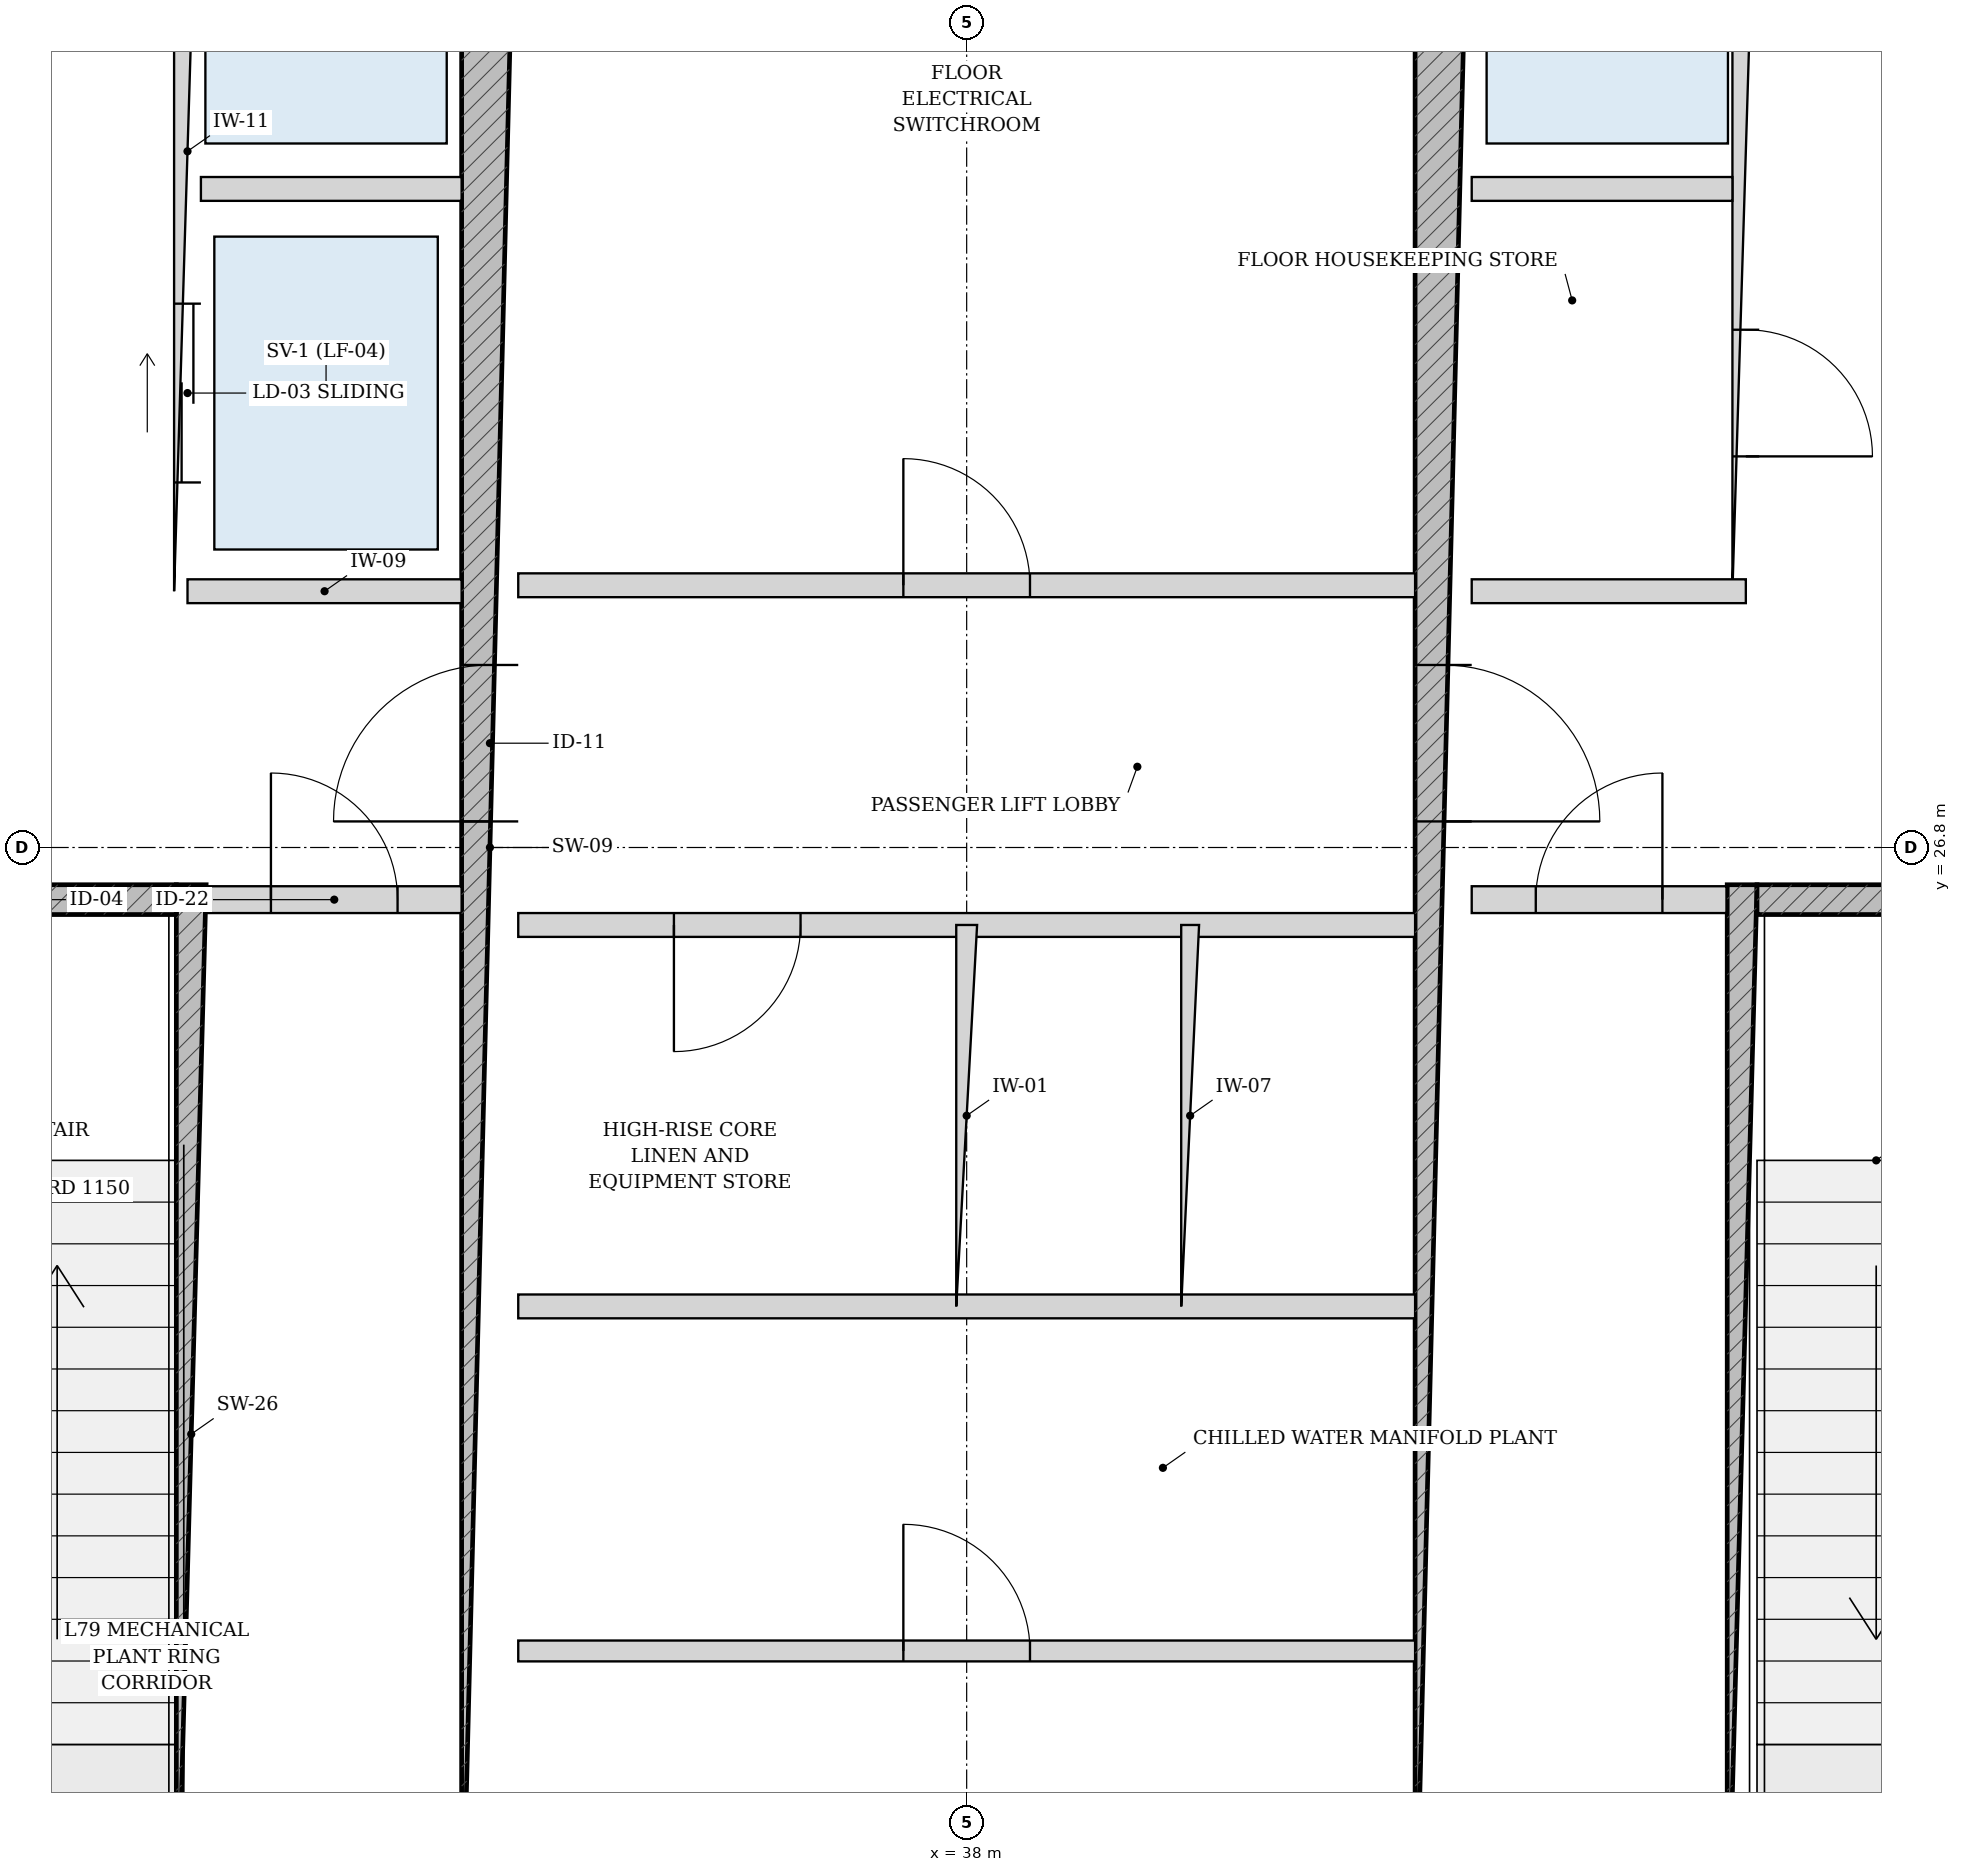
"""IFC4 building model, lengths in metres.
Left out: names, types, materials, properties, quantities, classifications, styles, units other than length and angle.
Written with IfcOpenShell. Run it as: python <this file> out.ifc"""

import sys

from ifc_helpers import new_model, si_unit, direction, frame, frame_2d, origin, place, context, subcontext, project, spatial, rectangle, extrude, source, transform, mapped, element, fill, save


model = new_model("IFC4")
c1 = context("Model", 3, precision=1e-05, world=origin(), true_north=direction((-0.2419218956, 0.970295726276)))
c2 = subcontext(c1, "Body", "Model", "MODEL_VIEW")
j1 = project(units=[si_unit("LENGTHUNIT", "METRE"), si_unit("PLANEANGLEUNIT", "RADIAN")], contexts=[c1])
p1 = place(None, origin())
s1 = spatial("IfcSite", under=j1, at=p1, CompositionType="ELEMENT")
p2 = place(p1, origin())
s2 = spatial("IfcBuilding", under=s1, at=p2, CompositionType="ELEMENT")
p3 = place(p2, frame((0.0, 0.0, 300.7)))
s3 = spatial("IfcBuildingStorey", under=s2, at=p3, CompositionType="ELEMENT", Elevation=300.7)
p4 = place(p3, frame((32.795, 19.175, 0.0), z_axis=(0.0, 0.0, 1.0), x_axis=(0.0, 1.0, 0.0)))
e1 = element("IfcWall", 1, at=p4, inside=s3, PredefinedType="SOLIDWALL", context=c2, shape_type="SweptSolid", body=[
    extrude(rectangle(XDim=7.375, YDim=0.2, at=frame_2d((3.688, 0.0))), origin(), (0.0, 0.0, 1.0), 4.98),
])
p5 = place(p3, frame((29.375, 26.45, 0.0), z_axis=(0.0, 0.0, 1.0), x_axis=(1.0, 0.0, 0.0)))
e2 = element("IfcWall", 2, at=p5, inside=s3, PredefinedType="SOLIDWALL", context=c2, shape_type="SweptSolid", body=[
    extrude(rectangle(XDim=3.32, YDim=0.2, at=frame_2d((1.66, 0.0))), origin(), (0.0, 0.0, 1.0), 4.98),
])
p6 = place(p5, frame((1.185, 0.0, 0.0)))
e3 = element("IfcOpeningElement", 3, at=p6, cuts=e2, PredefinedType="OPENING", context=c2, shape_type="SweptSolid", body=[
    extrude(rectangle(XDim=0.95, YDim=2.15, at=frame_2d((0.475, 1.075))), frame((0.0, 0.11, 0.0), z_axis=(0.0, -1.0, 0.0), x_axis=(1.0, 0.0, 0.0)), (0.0, 0.0, 1.0), 0.22),
])
p7 = place(p3, frame((43.205, 19.175, 0.0), z_axis=(0.0, 0.0, 1.0), x_axis=(0.0, 1.0, 0.0)))
e4 = element("IfcWall", 4, at=p7, inside=s3, PredefinedType="SOLIDWALL", context=c2, shape_type="SweptSolid", body=[
    extrude(rectangle(XDim=7.375, YDim=0.2, at=frame_2d((3.688, 0.0))), origin(), (0.0, 0.0, 1.0), 4.98),
])
p8 = place(p3, frame((43.305, 26.45, 0.0), z_axis=(0.0, 0.0, 1.0), x_axis=(1.0, 0.0, 0.0)))
e5 = element("IfcWall", 5, at=p8, inside=s3, PredefinedType="SOLIDWALL", context=c2, shape_type="SweptSolid", body=[
    extrude(rectangle(XDim=3.32, YDim=0.2, at=frame_2d((1.66, 0.0))), origin(), (0.0, 0.0, 1.0), 4.98),
])
p9 = place(p8, frame((1.185, 0.0, 0.0)))
e6 = element("IfcOpeningElement", 6, at=p9, cuts=e5, PredefinedType="OPENING", context=c2, shape_type="SweptSolid", body=[
    extrude(rectangle(XDim=0.95, YDim=2.15, at=frame_2d((0.475, 1.075))), frame((0.0, 0.11, 0.0), z_axis=(0.0, -1.0, 0.0), x_axis=(1.0, 0.0, 0.0)), (0.0, 0.0, 1.0), 0.22),
])
p10 = place(p3, frame((34.8, 19.175, 0.0), z_axis=(0.0, 0.0, 1.0), x_axis=(0.0, 1.0, 0.0)))
e7 = element("IfcWall", 7, at=p10, inside=s3, PredefinedType="SHEAR", context=c2, shape_type="SweptSolid", body=[
    extrude(rectangle(XDim=15.25, YDim=0.38, at=frame_2d((7.625, 0.0))), origin(), (0.0, 0.0, 1.0), 4.98),
])
p11 = place(p10, frame((7.8, 0.0, 0.0)))
e8 = element("IfcOpeningElement", 8, at=p11, cuts=e7, PredefinedType="OPENING", context=c2, shape_type="SweptSolid", body=[
    extrude(rectangle(XDim=1.05, YDim=2.15, at=frame_2d((0.525, 1.075))), frame((0.0, 0.2, 0.0), z_axis=(0.0, -1.0, 0.0), x_axis=(1.0, 0.0, 0.0)), (0.0, 0.0, 1.0), 0.4),
])
p12 = place(p3, frame((41.2, 19.175, 0.0), z_axis=(0.0, 0.0, 1.0), x_axis=(0.0, 1.0, 0.0)))
e9 = element("IfcWall", 9, at=p12, inside=s3, PredefinedType="SHEAR", context=c2, shape_type="SweptSolid", body=[
    extrude(rectangle(XDim=15.25, YDim=0.38, at=frame_2d((7.625, 0.0))), origin(), (0.0, 0.0, 1.0), 4.98),
])
p13 = place(p12, frame((7.8, 0.0, 0.0)))
e10 = element("IfcOpeningElement", 10, at=p13, cuts=e9, PredefinedType="OPENING", context=c2, shape_type="SweptSolid", body=[
    extrude(rectangle(XDim=1.05, YDim=2.15, at=frame_2d((0.525, 1.075))), frame((0.0, 0.2, 0.0), z_axis=(0.0, -1.0, 0.0), x_axis=(1.0, 0.0, 0.0)), (0.0, 0.0, 1.0), 0.4),
])
p14 = place(p3, frame((32.9, 26.45, 0.0), z_axis=(0.0, 0.0, 1.0), x_axis=(1.0, 0.0, 0.0)))
e11 = element("IfcWall", 11, at=p14, inside=s3, PredefinedType="PARTITIONING", context=c2, shape_type="SweptSolid", body=[
    extrude(rectangle(XDim=1.71, YDim=0.18, at=frame_2d((0.855, 0.0))), origin(), (0.0, 0.0, 1.0), 4.98),
])
p15 = place(p14, frame((0.43, 0.0, 0.0)))
e12 = element("IfcOpeningElement", 12, at=p15, cuts=e11, PredefinedType="OPENING", context=c2, shape_type="SweptSolid", body=[
    extrude(rectangle(XDim=0.85, YDim=2.1, at=frame_2d((0.425, 1.05))), frame((0.0, 0.1, 0.0), z_axis=(0.0, -1.0, 0.0), x_axis=(1.0, 0.0, 0.0)), (0.0, 0.0, 1.0), 0.2),
])
p16 = place(p3, frame((41.39, 26.45, 0.0), z_axis=(0.0, 0.0, 1.0), x_axis=(1.0, 0.0, 0.0)))
e13 = element("IfcWall", 13, at=p16, inside=s3, PredefinedType="PARTITIONING", context=c2, shape_type="SweptSolid", body=[
    extrude(rectangle(XDim=1.71, YDim=0.18, at=frame_2d((0.855, 0.0))), origin(), (0.0, 0.0, 1.0), 4.98),
])
p17 = place(p16, frame((0.43, 0.0, 0.0)))
e14 = element("IfcOpeningElement", 14, at=p17, cuts=e13, PredefinedType="OPENING", context=c2, shape_type="SweptSolid", body=[
    extrude(rectangle(XDim=0.85, YDim=2.1, at=frame_2d((0.425, 1.05))), frame((0.0, 0.1, 0.0), z_axis=(0.0, -1.0, 0.0), x_axis=(1.0, 0.0, 0.0)), (0.0, 0.0, 1.0), 0.2),
])
p18 = place(p3, frame((32.77, 28.52, 0.0), z_axis=(0.0, 0.0, 1.0), x_axis=(0.0, 1.0, 0.0)))
e15 = element("IfcWall", 15, at=p18, inside=s3, PredefinedType="PARTITIONING", context=c2, shape_type="SweptSolid", body=[
    extrude(rectangle(XDim=5.905, YDim=0.18, at=frame_2d((2.953, 0.0))), origin(), (0.0, 0.0, 1.0), 4.98),
])
p19 = place(p18, frame((3.655, 0.0, 0.0)))
e16 = element("IfcOpeningElement", 16, at=p19, cuts=e15, PredefinedType="OPENING", context=c2, shape_type="SweptSolid", body=[
    extrude(rectangle(XDim=1.15, YDim=2.2, at=frame_2d((0.575, 1.1))), frame((0.0, 0.1, 0.0), z_axis=(0.0, -1.0, 0.0), x_axis=(1.0, 0.0, 0.0)), (0.0, 0.0, 1.0), 0.2),
])
p20 = place(p18, frame((0.73, 0.0, 0.0)))
e17 = element("IfcOpeningElement", 17, at=p20, cuts=e15, PredefinedType="OPENING", context=c2, shape_type="SweptSolid", body=[
    extrude(rectangle(XDim=1.2, YDim=2.25, at=frame_2d((0.6, 1.125))), frame((0.0, 0.1, 0.0), z_axis=(0.0, -1.0, 0.0), x_axis=(1.0, 0.0, 0.0)), (0.0, 0.0, 1.0), 0.2),
])
p21 = place(p3, frame((32.86, 31.22, 0.0), z_axis=(0.0, 0.0, 1.0), x_axis=(1.0, 0.0, 0.0)))
e18 = element("IfcWall", 18, at=p21, inside=s3, PredefinedType="PARTITIONING", context=c2, shape_type="SweptSolid", body=[
    extrude(rectangle(XDim=1.75, YDim=0.16, at=frame_2d((0.875, 0.0))), origin(), (0.0, 0.0, 1.0), 4.98),
])
p22 = place(p3, frame((32.77, 28.52, 0.0), z_axis=(0.0, 0.0, 1.0), x_axis=(1.0, 0.0, 0.0)))
e19 = element("IfcWall", 19, at=p22, inside=s3, PredefinedType="PARTITIONING", context=c2, shape_type="SweptSolid", body=[
    extrude(rectangle(XDim=1.84, YDim=0.16, at=frame_2d((0.92, 0.0))), origin(), (0.0, 0.0, 1.0), 4.98),
])
p23 = place(p3, frame((43.23, 28.52, 0.0), z_axis=(0.0, 0.0, 1.0), x_axis=(0.0, 1.0, 0.0)))
e20 = element("IfcWall", 20, at=p23, inside=s3, PredefinedType="PARTITIONING", context=c2, shape_type="SweptSolid", body=[
    extrude(rectangle(XDim=5.905, YDim=0.18, at=frame_2d((2.953, 0.0))), origin(), (0.0, 0.0, 1.0), 4.98),
])
p24 = place(p23, frame((0.905, 0.0, 0.0)))
e21 = element("IfcOpeningElement", 21, at=p24, cuts=e20, PredefinedType="OPENING", context=c2, shape_type="SweptSolid", body=[
    extrude(rectangle(XDim=0.85, YDim=2.1, at=frame_2d((0.425, 1.05))), frame((0.0, 0.1, 0.0), z_axis=(0.0, -1.0, 0.0), x_axis=(1.0, 0.0, 0.0)), (0.0, 0.0, 1.0), 0.2),
])
p25 = place(p23, frame((3.655, 0.0, 0.0)))
e22 = element("IfcOpeningElement", 22, at=p25, cuts=e20, PredefinedType="OPENING", context=c2, shape_type="SweptSolid", body=[
    extrude(rectangle(XDim=1.15, YDim=2.2, at=frame_2d((0.575, 1.1))), frame((0.0, 0.1, 0.0), z_axis=(0.0, -1.0, 0.0), x_axis=(1.0, 0.0, 0.0)), (0.0, 0.0, 1.0), 0.2),
])
p26 = place(p3, frame((41.39, 31.22, 0.0), z_axis=(0.0, 0.0, 1.0), x_axis=(1.0, 0.0, 0.0)))
e23 = element("IfcWall", 23, at=p26, inside=s3, PredefinedType="PARTITIONING", context=c2, shape_type="SweptSolid", body=[
    extrude(rectangle(XDim=1.75, YDim=0.16, at=frame_2d((0.875, 0.0))), origin(), (0.0, 0.0, 1.0), 4.98),
])
p27 = place(p3, frame((41.39, 28.52, 0.0), z_axis=(0.0, 0.0, 1.0), x_axis=(1.0, 0.0, 0.0)))
e24 = element("IfcWall", 24, at=p27, inside=s3, PredefinedType="PARTITIONING", context=c2, shape_type="SweptSolid", body=[
    extrude(rectangle(XDim=1.84, YDim=0.16, at=frame_2d((0.92, 0.0))), origin(), (0.0, 0.0, 1.0), 4.98),
])
p28 = place(p3, frame((34.99, 28.56, 0.0), z_axis=(0.0, 0.0, 1.0), x_axis=(1.0, 0.0, 0.0)))
e25 = element("IfcWall", 25, at=p28, inside=s3, PredefinedType="PARTITIONING", context=c2, shape_type="SweptSolid", body=[
    extrude(rectangle(XDim=6.02, YDim=0.16, at=frame_2d((3.01, 0.0))), origin(), (0.0, 0.0, 1.0), 4.98),
])
p29 = place(p28, frame((2.585, 0.0, 0.0)))
e26 = element("IfcOpeningElement", 26, at=p29, cuts=e25, PredefinedType="OPENING", context=c2, shape_type="SweptSolid", body=[
    extrude(rectangle(XDim=0.85, YDim=2.1, at=frame_2d((0.425, 1.05))), frame((0.0, 0.09, 0.0), z_axis=(0.0, -1.0, 0.0), x_axis=(1.0, 0.0, 0.0)), (0.0, 0.0, 1.0), 0.18),
])
p30 = place(p3, frame((34.99, 26.28, 0.0), z_axis=(0.0, 0.0, 1.0), x_axis=(1.0, 0.0, 0.0)))
e27 = element("IfcWall", 27, at=p30, inside=s3, PredefinedType="PARTITIONING", context=c2, shape_type="SweptSolid", body=[
    extrude(rectangle(XDim=6.02, YDim=0.16, at=frame_2d((3.01, 0.0))), origin(), (0.0, 0.0, 1.0), 4.98),
])
p31 = place(p30, frame((1.045, 0.0, 0.0)))
e28 = element("IfcOpeningElement", 28, at=p31, cuts=e27, PredefinedType="OPENING", context=c2, shape_type="SweptSolid", body=[
    extrude(rectangle(XDim=0.85, YDim=2.1, at=frame_2d((0.425, 1.05))), frame((0.0, 0.09, 0.0), z_axis=(0.0, -1.0, 0.0), x_axis=(1.0, 0.0, 0.0)), (0.0, 0.0, 1.0), 0.18),
])
p32 = place(p3, frame((34.99, 23.72, 0.0), z_axis=(0.0, 0.0, 1.0), x_axis=(1.0, 0.0, 0.0)))
e29 = element("IfcWall", 29, at=p32, inside=s3, PredefinedType="PARTITIONING", context=c2, shape_type="SweptSolid", body=[
    extrude(rectangle(XDim=6.02, YDim=0.16, at=frame_2d((3.01, 0.0))), origin(), (0.0, 0.0, 1.0), 4.98),
])
p33 = place(p3, frame((38.0, 23.72, 0.0), z_axis=(0.0, 0.0, 1.0), x_axis=(0.0, 1.0, 0.0)))
e30 = element("IfcWall", 30, at=p33, inside=s3, PredefinedType="PARTITIONING", context=c2, shape_type="SweptSolid", body=[
    extrude(rectangle(XDim=2.56, YDim=0.14, at=frame_2d((1.28, 0.0))), origin(), (0.0, 0.0, 1.0), 4.98),
])
p34 = place(p3, frame((39.5, 23.72, 0.0), z_axis=(0.0, 0.0, 1.0), x_axis=(0.0, 1.0, 0.0)))
e31 = element("IfcWall", 31, at=p34, inside=s3, PredefinedType="PARTITIONING", context=c2, shape_type="SweptSolid", body=[
    extrude(rectangle(XDim=2.56, YDim=0.12, at=frame_2d((1.28, 0.0))), origin(), (0.0, 0.0, 1.0), 4.98),
])
p35 = place(p3, frame((34.99, 21.407, 0.0), z_axis=(0.0, 0.0, 1.0), x_axis=(1.0, 0.0, 0.0)))
e32 = element("IfcWall", 32, at=p35, inside=s3, PredefinedType="PARTITIONING", context=c2, shape_type="SweptSolid", body=[
    extrude(rectangle(XDim=6.02, YDim=0.14, at=frame_2d((3.01, 0.0))), origin(), (0.0, 0.0, 1.0), 4.98),
])
p36 = place(p35, frame((2.585, 0.0, 0.0)))
e33 = element("IfcOpeningElement", 33, at=p36, cuts=e32, PredefinedType="OPENING", context=c2, shape_type="SweptSolid", body=[
    extrude(rectangle(XDim=0.85, YDim=2.1, at=frame_2d((0.425, 1.05))), frame((0.0, 0.08, 0.0), z_axis=(0.0, -1.0, 0.0), x_axis=(1.0, 0.0, 0.0)), (0.0, 0.0, 1.0), 0.16),
])
m1 = source(origin(), c2, "Body", "SweptSolid", [
    extrude(rectangle(XDim=1.05, YDim=2.15, at=frame_2d((0.525, 1.075))), frame((0.0, 0.025, 0.0), z_axis=(0.0, -1.0, 0.0), x_axis=(1.0, 0.0, 0.0)), (0.0, 0.0, 1.0), 0.05),
])
p37 = place(p11, origin())
e34 = element("IfcDoor", 34, at=p37, inside=s3, OperationType="SINGLE_SWING_LEFT", PredefinedType="DOOR", context=c2, shape_type="MappedRepresentation", body=[
    mapped(m1, transform((0.0, 0.0, 0.0), scale=1.0)),
])
fill(e8, e34)
p38 = place(p13, frame((1.05, 0.0, 0.0), z_axis=(0.0, 0.0, 1.0), x_axis=(-1.0, 0.0, 0.0)))
e35 = element("IfcDoor", 35, at=p38, inside=s3, OperationType="SINGLE_SWING_RIGHT", PredefinedType="DOOR", context=c2, shape_type="MappedRepresentation", body=[
    mapped(m1, transform((0.0, 0.0, 0.0), scale=1.0)),
])
fill(e10, e35)
m2 = source(origin(), c2, "Body", "SweptSolid", [
    extrude(rectangle(XDim=0.85, YDim=2.1, at=frame_2d((0.425, 1.05))), frame((0.0, 0.025, 0.0), z_axis=(0.0, -1.0, 0.0), x_axis=(1.0, 0.0, 0.0)), (0.0, 0.0, 1.0), 0.05),
])
p39 = place(p15, origin())
e36 = element("IfcDoor", 36, at=p39, inside=s3, OperationType="SINGLE_SWING_LEFT", PredefinedType="DOOR", context=c2, shape_type="MappedRepresentation", body=[
    mapped(m2, transform((0.0, 0.0, 0.0), scale=1.0)),
])
fill(e12, e36)
p40 = place(p17, origin())
e37 = element("IfcDoor", 37, at=p40, inside=s3, OperationType="SINGLE_SWING_RIGHT", PredefinedType="DOOR", context=c2, shape_type="MappedRepresentation", body=[
    mapped(m2, transform((0.0, 0.0, 0.0), scale=1.0)),
])
fill(e14, e37)
p41 = place(p24, frame((0.85, 0.0, 0.0), z_axis=(0.0, 0.0, 1.0), x_axis=(-1.0, 0.0, 0.0)))
e38 = element("IfcDoor", 38, at=p41, inside=s3, OperationType="SINGLE_SWING_RIGHT", PredefinedType="DOOR", context=c2, shape_type="MappedRepresentation", body=[
    mapped(m2, transform((0.0, 0.0, 0.0), scale=1.0)),
])
fill(e21, e38)
p42 = place(p29, origin())
e39 = element("IfcDoor", 39, at=p42, inside=s3, OperationType="SINGLE_SWING_LEFT", PredefinedType="DOOR", context=c2, shape_type="MappedRepresentation", body=[
    mapped(m2, transform((0.0, 0.0, 0.0), scale=1.0)),
])
fill(e26, e39)
p43 = place(p31, frame((0.85, 0.0, 0.0), z_axis=(0.0, 0.0, 1.0), x_axis=(-1.0, 0.0, 0.0)))
e40 = element("IfcDoor", 40, at=p43, inside=s3, OperationType="SINGLE_SWING_RIGHT", PredefinedType="DOOR", context=c2, shape_type="MappedRepresentation", body=[
    mapped(m2, transform((0.0, 0.0, 0.0), scale=1.0)),
])
fill(e28, e40)
p44 = place(p36, origin())
e41 = element("IfcDoor", 41, at=p44, inside=s3, OperationType="SINGLE_SWING_LEFT", PredefinedType="DOOR", context=c2, shape_type="MappedRepresentation", body=[
    mapped(m2, transform((0.0, 0.0, 0.0), scale=1.0)),
])
fill(e33, e41)
m3 = source(origin(), c2, "Body", "SweptSolid", [
    extrude(rectangle(XDim=1.2, YDim=2.25, at=frame_2d((0.6, 1.125))), frame((0.0, 0.025, 0.0), z_axis=(0.0, -1.0, 0.0), x_axis=(1.0, 0.0, 0.0)), (0.0, 0.0, 1.0), 0.05),
])
p45 = place(p20, origin())
e42 = element("IfcDoor", 42, at=p45, inside=s3, OperationType="DOUBLE_DOOR_SLIDING", PredefinedType="DOOR", context=c2, shape_type="MappedRepresentation", body=[
    mapped(m3, transform((0.0, 0.0, 0.0), scale=1.0)),
])
fill(e17, e42)
save(model, sys.argv[1])
